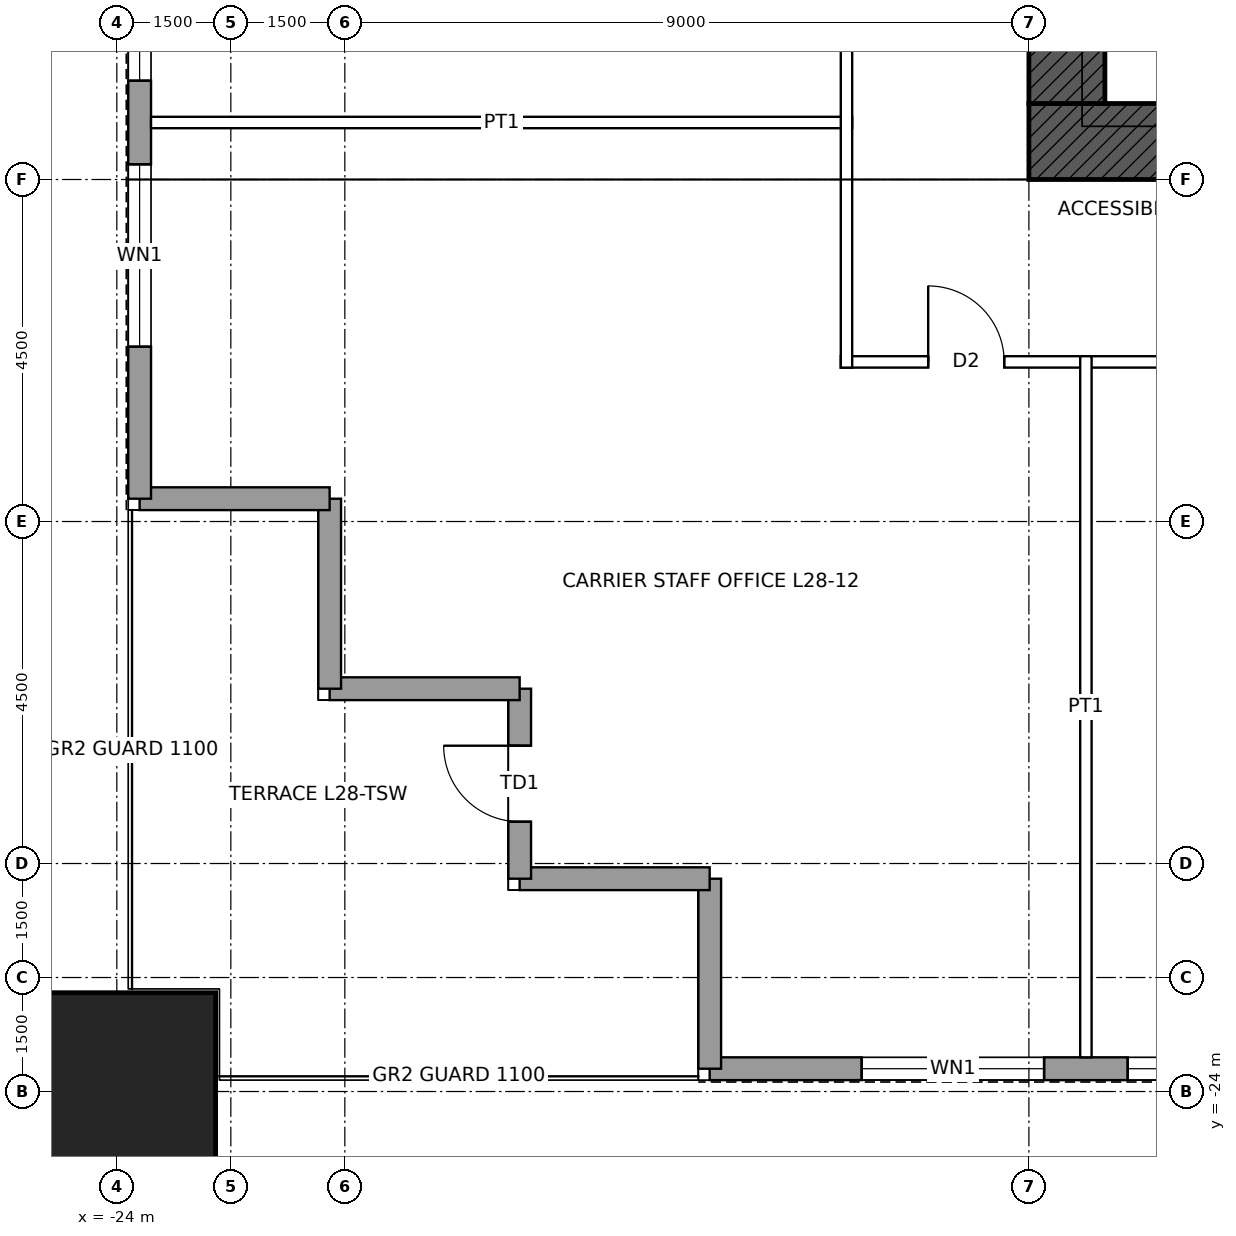
"""IFC4 building model, lengths in metres.
Left out: names, types, materials, properties, quantities, classifications, styles, units other than length and angle.
Written with IfcOpenShell. Run it as: python <this file> out.ifc"""

import sys

from ifc_helpers import new_model, si_unit, direction, frame, frame_2d, origin, origin_2d, place, context, subcontext, project, spatial, rectangle, hollow_rectangle, extrude, element, fill, save


model = new_model("IFC4")
c1 = context("Model", 3, precision=1e-05, world=origin(), true_north=direction((0.0, 1.0)))
c2 = subcontext(c1, "Body", "Model", "MODEL_VIEW")
j1 = project(units=[si_unit("LENGTHUNIT", "METRE"), si_unit("PLANEANGLEUNIT", "RADIAN")], contexts=[c1])
p1 = place(None, origin())
s1 = spatial("IfcSite", under=j1, at=p1, CompositionType="ELEMENT")
p2 = place(p1, origin())
s2 = spatial("IfcBuilding", under=s1, at=p2, CompositionType="ELEMENT")
p3 = place(p2, frame((0.0, 0.0, 140.4)))
s3 = spatial("IfcBuildingStorey", under=s2, at=p3, CompositionType="ELEMENT", Elevation=140.4)
p4 = place(p3, frame((-24.0, -24.0, 0.0), z_axis=(0.0, 0.0, 1.0), x_axis=(1.0, 0.0, 0.0)))
e1 = element("IfcColumn", 1, at=p4, inside=s3, PredefinedType="COLUMN", context=c2, shape_type="SweptSolid", body=[
    extrude(hollow_rectangle(XDim=2.6, YDim=2.6, WallThickness=0.13, at=origin_2d()), origin(), (0.0, 0.0, 1.0), 4.5),
])
p5 = place(p3, frame((12.0, -11.5, 0.0), z_axis=(0.0, 0.0, 1.0), x_axis=(-1.0, 0.0, 0.0)))
e2 = element("IfcWall", 2, at=p5, inside=s3, PredefinedType="SHEAR", context=c2, shape_type="SweptSolid", body=[
    extrude(rectangle(XDim=24.0, YDim=1.0, at=frame_2d((12.0, 0.0))), origin(), (0.0, 0.0, 1.0), 4.5),
])
p6 = place(p5, frame((11.5, 0.0, 0.0)))
e3 = element("IfcOpeningElement", 3, at=p6, cuts=e2, PredefinedType="OPENING", context=c2, shape_type="SweptSolid", body=[
    extrude(rectangle(XDim=1.0, YDim=2.1, at=frame_2d((0.5, 1.05))), frame((0.0, 0.51, 0.0), z_axis=(0.0, -1.0, 0.0), x_axis=(1.0, 0.0, 0.0)), (0.0, 0.0, 1.0), 1.02),
])
p7 = place(p5, frame((1.0, 0.0, 0.0)))
e4 = element("IfcOpeningElement", 4, at=p7, cuts=e2, PredefinedType="OPENING", context=c2, shape_type="SweptSolid", body=[
    extrude(rectangle(XDim=1.0, YDim=2.4, at=frame_2d((0.5, 1.2))), frame((0.0, 0.51, 0.0), z_axis=(0.0, -1.0, 0.0), x_axis=(1.0, 0.0, 0.0)), (0.0, 0.0, 1.0), 1.02),
])
p8 = place(p3, frame((-11.5, -11.0, 0.0), z_axis=(0.0, 0.0, 1.0), x_axis=(0.0, 1.0, 0.0)))
e5 = element("IfcWall", 5, at=p8, inside=s3, PredefinedType="SHEAR", context=c2, shape_type="SweptSolid", body=[
    extrude(rectangle(XDim=22.0, YDim=1.0, at=frame_2d((11.0, 0.0))), origin(), (0.0, 0.0, 1.0), 4.5),
])
p9 = place(p8, frame((10.5, 0.0, 0.0)))
e6 = element("IfcOpeningElement", 6, at=p9, cuts=e5, PredefinedType="OPENING", context=c2, shape_type="SweptSolid", body=[
    extrude(rectangle(XDim=1.0, YDim=2.4, at=frame_2d((0.5, 1.2))), frame((0.0, 0.51, 0.0), z_axis=(0.0, -1.0, 0.0), x_axis=(1.0, 0.0, 0.0)), (0.0, 0.0, 1.0), 1.02),
])
p10 = place(p3, frame((16.2, -23.7, 0.0), z_axis=(0.0, 0.0, 1.0), x_axis=(-1.0, 0.0, 0.0)))
e7 = element("IfcWall", 7, at=p10, inside=s3, PredefinedType="SOLIDWALL", context=c2, shape_type="SweptSolid", body=[
    extrude(rectangle(XDim=32.4, YDim=0.3, at=frame_2d((16.2, 0.0))), origin(), (0.0, 0.0, 1.0), 4.3),
])
p11 = place(p10, frame((2.0, 0.0, 1.0)))
e8 = element("IfcOpeningElement", 8, at=p11, cuts=e7, PredefinedType="OPENING", context=c2, shape_type="SweptSolid", body=[
    extrude(rectangle(XDim=2.4, YDim=1.2, at=frame_2d((1.2, 0.6))), frame((0.0, 0.16, 0.0), z_axis=(0.0, -1.0, 0.0), x_axis=(1.0, 0.0, 0.0)), (0.0, 0.0, 1.0), 0.32),
])
p12 = place(p10, frame((5.5, 0.0, 1.0)))
e9 = element("IfcOpeningElement", 9, at=p12, cuts=e7, PredefinedType="OPENING", context=c2, shape_type="SweptSolid", body=[
    extrude(rectangle(XDim=2.4, YDim=1.2, at=frame_2d((1.2, 0.6))), frame((0.0, 0.16, 0.0), z_axis=(0.0, -1.0, 0.0), x_axis=(1.0, 0.0, 0.0)), (0.0, 0.0, 1.0), 0.32),
])
p13 = place(p10, frame((9.5, 0.0, 1.0)))
e10 = element("IfcOpeningElement", 10, at=p13, cuts=e7, PredefinedType="OPENING", context=c2, shape_type="SweptSolid", body=[
    extrude(rectangle(XDim=2.4, YDim=1.2, at=frame_2d((1.2, 0.6))), frame((0.0, 0.16, 0.0), z_axis=(0.0, -1.0, 0.0), x_axis=(1.0, 0.0, 0.0)), (0.0, 0.0, 1.0), 0.32),
])
p14 = place(p10, frame((13.0, 0.0, 1.0)))
e11 = element("IfcOpeningElement", 11, at=p14, cuts=e7, PredefinedType="OPENING", context=c2, shape_type="SweptSolid", body=[
    extrude(rectangle(XDim=2.4, YDim=1.2, at=frame_2d((1.2, 0.6))), frame((0.0, 0.16, 0.0), z_axis=(0.0, -1.0, 0.0), x_axis=(1.0, 0.0, 0.0)), (0.0, 0.0, 1.0), 0.32),
])
p15 = place(p10, frame((17.0, 0.0, 1.0)))
e12 = element("IfcOpeningElement", 12, at=p15, cuts=e7, PredefinedType="OPENING", context=c2, shape_type="SweptSolid", body=[
    extrude(rectangle(XDim=2.4, YDim=1.2, at=frame_2d((1.2, 0.6))), frame((0.0, 0.16, 0.0), z_axis=(0.0, -1.0, 0.0), x_axis=(1.0, 0.0, 0.0)), (0.0, 0.0, 1.0), 0.32),
])
p16 = place(p10, frame((20.5, 0.0, 1.0)))
e13 = element("IfcOpeningElement", 13, at=p16, cuts=e7, PredefinedType="OPENING", context=c2, shape_type="SweptSolid", body=[
    extrude(rectangle(XDim=2.4, YDim=1.2, at=frame_2d((1.2, 0.6))), frame((0.0, 0.16, 0.0), z_axis=(0.0, -1.0, 0.0), x_axis=(1.0, 0.0, 0.0)), (0.0, 0.0, 1.0), 0.32),
])
p17 = place(p10, frame((24.5, 0.0, 1.0)))
e14 = element("IfcOpeningElement", 14, at=p17, cuts=e7, PredefinedType="OPENING", context=c2, shape_type="SweptSolid", body=[
    extrude(rectangle(XDim=2.4, YDim=1.2, at=frame_2d((1.2, 0.6))), frame((0.0, 0.16, 0.0), z_axis=(0.0, -1.0, 0.0), x_axis=(1.0, 0.0, 0.0)), (0.0, 0.0, 1.0), 0.32),
])
p18 = place(p10, frame((28.0, 0.0, 1.0)))
e15 = element("IfcOpeningElement", 15, at=p18, cuts=e7, PredefinedType="OPENING", context=c2, shape_type="SweptSolid", body=[
    extrude(rectangle(XDim=2.4, YDim=1.2, at=frame_2d((1.2, 0.6))), frame((0.0, 0.16, 0.0), z_axis=(0.0, -1.0, 0.0), x_axis=(1.0, 0.0, 0.0)), (0.0, 0.0, 1.0), 0.32),
])
for number, where, z_axis, x_axis in (
    (16, (-16.2, -23.7, 0.0), (0.0, 0.0, 1.0), (0.0, 1.0, 0.0)),
    (17, (-16.2, -21.2, 0.0), (0.0, 0.0, 1.0), (-1.0, 0.0, 0.0)),
):
    element("IfcWall", number, at=place(p3, frame(where, z_axis=z_axis, x_axis=x_axis)), inside=s3, PredefinedType="SOLIDWALL", context=c2, shape_type="SweptSolid", body=[
        extrude(rectangle(XDim=2.5, YDim=0.3, at=frame_2d((1.25, 0.0))), origin(), (0.0, 0.0, 1.0), 4.3),
    ])
p19 = place(p3, frame((-18.7, -21.2, 0.0), z_axis=(0.0, 0.0, 1.0), x_axis=(0.0, 1.0, 0.0)))
e18 = element("IfcWall", 18, at=p19, inside=s3, PredefinedType="SOLIDWALL", context=c2, shape_type="SweptSolid", body=[
    extrude(rectangle(XDim=2.5, YDim=0.3, at=frame_2d((1.25, 0.0))), origin(), (0.0, 0.0, 1.0), 4.3),
])
p20 = place(p19, frame((0.75, 0.0, 0.0)))
e19 = element("IfcOpeningElement", 19, at=p20, cuts=e18, PredefinedType="OPENING", context=c2, shape_type="SweptSolid", body=[
    extrude(rectangle(XDim=1.0, YDim=2.4, at=frame_2d((0.5, 1.2))), frame((0.0, 0.16, 0.0), z_axis=(0.0, -1.0, 0.0), x_axis=(1.0, 0.0, 0.0)), (0.0, 0.0, 1.0), 0.32),
])
for number, where, z_axis, x_axis in (
    (20, (-18.7, -18.7, 0.0), (0.0, 0.0, 1.0), (-1.0, 0.0, 0.0)),
    (21, (-21.2, -18.7, 0.0), (0.0, 0.0, 1.0), (0.0, 1.0, 0.0)),
    (22, (-21.2, -16.2, 0.0), (0.0, 0.0, 1.0), (-1.0, 0.0, 0.0)),
):
    element("IfcWall", number, at=place(p3, frame(where, z_axis=z_axis, x_axis=x_axis)), inside=s3, PredefinedType="SOLIDWALL", context=c2, shape_type="SweptSolid", body=[
        extrude(rectangle(XDim=2.5, YDim=0.3, at=frame_2d((1.25, 0.0))), origin(), (0.0, 0.0, 1.0), 4.3),
    ])
p21 = place(p3, frame((-23.7, -16.2, 0.0), z_axis=(0.0, 0.0, 1.0), x_axis=(0.0, 1.0, 0.0)))
e23 = element("IfcWall", 23, at=p21, inside=s3, PredefinedType="SOLIDWALL", context=c2, shape_type="SweptSolid", body=[
    extrude(rectangle(XDim=32.4, YDim=0.3, at=frame_2d((16.2, 0.0))), origin(), (0.0, 0.0, 1.0), 4.3),
])
p22 = place(p21, frame((2.0, 0.0, 1.0)))
e24 = element("IfcOpeningElement", 24, at=p22, cuts=e23, PredefinedType="OPENING", context=c2, shape_type="SweptSolid", body=[
    extrude(rectangle(XDim=2.4, YDim=1.2, at=frame_2d((1.2, 0.6))), frame((0.0, 0.16, 0.0), z_axis=(0.0, -1.0, 0.0), x_axis=(1.0, 0.0, 0.0)), (0.0, 0.0, 1.0), 0.32),
])
p23 = place(p21, frame((5.5, 0.0, 1.0)))
e25 = element("IfcOpeningElement", 25, at=p23, cuts=e23, PredefinedType="OPENING", context=c2, shape_type="SweptSolid", body=[
    extrude(rectangle(XDim=2.4, YDim=1.2, at=frame_2d((1.2, 0.6))), frame((0.0, 0.16, 0.0), z_axis=(0.0, -1.0, 0.0), x_axis=(1.0, 0.0, 0.0)), (0.0, 0.0, 1.0), 0.32),
])
p24 = place(p21, frame((9.5, 0.0, 1.0)))
e26 = element("IfcOpeningElement", 26, at=p24, cuts=e23, PredefinedType="OPENING", context=c2, shape_type="SweptSolid", body=[
    extrude(rectangle(XDim=2.4, YDim=1.2, at=frame_2d((1.2, 0.6))), frame((0.0, 0.16, 0.0), z_axis=(0.0, -1.0, 0.0), x_axis=(1.0, 0.0, 0.0)), (0.0, 0.0, 1.0), 0.32),
])
p25 = place(p21, frame((13.0, 0.0, 1.0)))
e27 = element("IfcOpeningElement", 27, at=p25, cuts=e23, PredefinedType="OPENING", context=c2, shape_type="SweptSolid", body=[
    extrude(rectangle(XDim=2.4, YDim=1.2, at=frame_2d((1.2, 0.6))), frame((0.0, 0.16, 0.0), z_axis=(0.0, -1.0, 0.0), x_axis=(1.0, 0.0, 0.0)), (0.0, 0.0, 1.0), 0.32),
])
p26 = place(p21, frame((17.0, 0.0, 1.0)))
e28 = element("IfcOpeningElement", 28, at=p26, cuts=e23, PredefinedType="OPENING", context=c2, shape_type="SweptSolid", body=[
    extrude(rectangle(XDim=2.4, YDim=1.2, at=frame_2d((1.2, 0.6))), frame((0.0, 0.16, 0.0), z_axis=(0.0, -1.0, 0.0), x_axis=(1.0, 0.0, 0.0)), (0.0, 0.0, 1.0), 0.32),
])
p27 = place(p21, frame((20.5, 0.0, 1.0)))
e29 = element("IfcOpeningElement", 29, at=p27, cuts=e23, PredefinedType="OPENING", context=c2, shape_type="SweptSolid", body=[
    extrude(rectangle(XDim=2.4, YDim=1.2, at=frame_2d((1.2, 0.6))), frame((0.0, 0.16, 0.0), z_axis=(0.0, -1.0, 0.0), x_axis=(1.0, 0.0, 0.0)), (0.0, 0.0, 1.0), 0.32),
])
p28 = place(p21, frame((24.5, 0.0, 1.0)))
e30 = element("IfcOpeningElement", 30, at=p28, cuts=e23, PredefinedType="OPENING", context=c2, shape_type="SweptSolid", body=[
    extrude(rectangle(XDim=2.4, YDim=1.2, at=frame_2d((1.2, 0.6))), frame((0.0, 0.16, 0.0), z_axis=(0.0, -1.0, 0.0), x_axis=(1.0, 0.0, 0.0)), (0.0, 0.0, 1.0), 0.32),
])
p29 = place(p21, frame((28.0, 0.0, 1.0)))
e31 = element("IfcOpeningElement", 31, at=p29, cuts=e23, PredefinedType="OPENING", context=c2, shape_type="SweptSolid", body=[
    extrude(rectangle(XDim=2.4, YDim=1.2, at=frame_2d((1.2, 0.6))), frame((0.0, 0.16, 0.0), z_axis=(0.0, -1.0, 0.0), x_axis=(1.0, 0.0, 0.0)), (0.0, 0.0, 1.0), 0.32),
])
p30 = place(p3, frame((-14.475, -14.4, 0.0), z_axis=(0.0, 0.0, 1.0), x_axis=(1.0, 0.0, 0.0)))
e32 = element("IfcWall", 32, at=p30, inside=s3, PredefinedType="PARTITIONING", context=c2, shape_type="SweptSolid", body=[
    extrude(rectangle(XDim=28.95, YDim=0.15, at=frame_2d((14.475, 0.0))), origin(), (0.0, 0.0, 1.0), 4.3),
])
p31 = place(p30, frame((21.075, 0.0, 0.0)))
e33 = element("IfcOpeningElement", 33, at=p31, cuts=e32, PredefinedType="OPENING", context=c2, shape_type="SweptSolid", body=[
    extrude(rectangle(XDim=1.8, YDim=2.4, at=frame_2d((0.9, 1.2))), frame((0.0, 0.085, 0.0), z_axis=(0.0, -1.0, 0.0), x_axis=(1.0, 0.0, 0.0)), (0.0, 0.0, 1.0), 0.17),
])
p32 = place(p30, frame((9.825, 0.0, 0.0)))
e34 = element("IfcOpeningElement", 34, at=p32, cuts=e32, PredefinedType="OPENING", context=c2, shape_type="SweptSolid", body=[
    extrude(rectangle(XDim=1.8, YDim=2.4, at=frame_2d((0.9, 1.2))), frame((0.0, 0.085, 0.0), z_axis=(0.0, -1.0, 0.0), x_axis=(1.0, 0.0, 0.0)), (0.0, 0.0, 1.0), 0.17),
])
p33 = place(p30, frame((26.8, 0.0, 0.0)))
e35 = element("IfcOpeningElement", 35, at=p33, cuts=e32, PredefinedType="OPENING", context=c2, shape_type="SweptSolid", body=[
    extrude(rectangle(XDim=1.0, YDim=2.1, at=frame_2d((0.5, 1.05))), frame((0.0, 0.085, 0.0), z_axis=(0.0, -1.0, 0.0), x_axis=(1.0, 0.0, 0.0)), (0.0, 0.0, 1.0), 0.17),
])
p34 = place(p30, frame((1.15, 0.0, 0.0)))
e36 = element("IfcOpeningElement", 36, at=p34, cuts=e32, PredefinedType="OPENING", context=c2, shape_type="SweptSolid", body=[
    extrude(rectangle(XDim=1.0, YDim=2.1, at=frame_2d((0.5, 1.05))), frame((0.0, 0.085, 0.0), z_axis=(0.0, -1.0, 0.0), x_axis=(1.0, 0.0, 0.0)), (0.0, 0.0, 1.0), 0.17),
])
p35 = place(p3, frame((-23.55, -11.25, 0.0), z_axis=(0.0, 0.0, 1.0), x_axis=(1.0, 0.0, 0.0)))
e37 = element("IfcWall", 37, at=p35, inside=s3, PredefinedType="PARTITIONING", context=c2, shape_type="SweptSolid", body=[
    extrude(rectangle(XDim=9.225, YDim=0.15, at=frame_2d((4.613, 0.0))), origin(), (0.0, 0.0, 1.0), 3.431),
])
p36 = place(p3, frame((-14.4, -14.475, 0.0), z_axis=(0.0, 0.0, 1.0), x_axis=(0.0, 1.0, 0.0)))
e38 = element("IfcWall", 38, at=p36, inside=s3, PredefinedType="PARTITIONING", context=c2, shape_type="SweptSolid", body=[
    extrude(rectangle(XDim=28.95, YDim=0.15, at=frame_2d((14.475, 0.0))), origin(), (0.0, 0.0, 1.0), 4.3),
])
p37 = place(p36, frame((4.2, 0.0, 0.0)))
e39 = element("IfcOpeningElement", 39, at=p37, cuts=e38, PredefinedType="OPENING", context=c2, shape_type="SweptSolid", body=[
    extrude(rectangle(XDim=1.8, YDim=2.4, at=frame_2d((0.9, 1.2))), frame((0.0, 0.085, 0.0), z_axis=(0.0, -1.0, 0.0), x_axis=(1.0, 0.0, 0.0)), (0.0, 0.0, 1.0), 0.17),
])
p38 = place(p36, frame((12.1, 0.0, 0.0)))
e40 = element("IfcOpeningElement", 40, at=p38, cuts=e38, PredefinedType="OPENING", context=c2, shape_type="SweptSolid", body=[
    extrude(rectangle(XDim=1.0, YDim=2.1, at=frame_2d((0.5, 1.05))), frame((0.0, 0.085, 0.0), z_axis=(0.0, -1.0, 0.0), x_axis=(1.0, 0.0, 0.0)), (0.0, 0.0, 1.0), 0.17),
])
p39 = place(p36, frame((21.075, 0.0, 0.0)))
e41 = element("IfcOpeningElement", 41, at=p39, cuts=e38, PredefinedType="OPENING", context=c2, shape_type="SweptSolid", body=[
    extrude(rectangle(XDim=1.8, YDim=2.4, at=frame_2d((0.9, 1.2))), frame((0.0, 0.085, 0.0), z_axis=(0.0, -1.0, 0.0), x_axis=(1.0, 0.0, 0.0)), (0.0, 0.0, 1.0), 0.17),
])
p40 = place(p3, frame((-11.25, -23.55, 0.0), z_axis=(0.0, 0.0, 1.0), x_axis=(0.0, 1.0, 0.0)))
e42 = element("IfcWall", 42, at=p40, inside=s3, PredefinedType="PARTITIONING", context=c2, shape_type="SweptSolid", body=[
    extrude(rectangle(XDim=9.225, YDim=0.15, at=frame_2d((4.613, 0.0))), origin(), (0.0, 0.0, 1.0), 3.431),
])
p41 = place(p17, origin())
e43 = element("IfcWindow", 43, at=p41, inside=s3, PartitioningType="SINGLE_PANEL", PredefinedType="WINDOW", context=c2, shape_type="SweptSolid", body=[
    extrude(rectangle(XDim=2.4, YDim=1.2, at=frame_2d((1.2, 0.6))), frame((0.0, 0.03, 0.0), z_axis=(0.0, -1.0, 0.0), x_axis=(1.0, 0.0, 0.0)), (0.0, 0.0, 1.0), 0.06),
])
fill(e14, e43)
p42 = place(p18, origin())
e44 = element("IfcWindow", 44, at=p42, inside=s3, PartitioningType="SINGLE_PANEL", PredefinedType="WINDOW", context=c2, shape_type="SweptSolid", body=[
    extrude(rectangle(XDim=2.4, YDim=1.2, at=frame_2d((1.2, 0.6))), frame((0.0, 0.03, 0.0), z_axis=(0.0, -1.0, 0.0), x_axis=(1.0, 0.0, 0.0)), (0.0, 0.0, 1.0), 0.06),
])
fill(e15, e44)
p43 = place(p20, origin())
e45 = element("IfcDoor", 45, at=p43, inside=s3, OperationType="SINGLE_SWING_RIGHT", PredefinedType="DOOR", context=c2, shape_type="SweptSolid", body=[
    extrude(rectangle(XDim=1.0, YDim=2.4, at=frame_2d((0.5, 1.2))), frame((0.0, 0.025, 0.0), z_axis=(0.0, -1.0, 0.0), x_axis=(1.0, 0.0, 0.0)), (0.0, 0.0, 1.0), 0.05),
])
fill(e19, e45)
p44 = place(p22, origin())
e46 = element("IfcWindow", 46, at=p44, inside=s3, PartitioningType="SINGLE_PANEL", PredefinedType="WINDOW", context=c2, shape_type="SweptSolid", body=[
    extrude(rectangle(XDim=2.4, YDim=1.2, at=frame_2d((1.2, 0.6))), frame((0.0, 0.03, 0.0), z_axis=(0.0, -1.0, 0.0), x_axis=(1.0, 0.0, 0.0)), (0.0, 0.0, 1.0), 0.06),
])
fill(e24, e46)
p45 = place(p23, origin())
e47 = element("IfcWindow", 47, at=p45, inside=s3, PartitioningType="SINGLE_PANEL", PredefinedType="WINDOW", context=c2, shape_type="SweptSolid", body=[
    extrude(rectangle(XDim=2.4, YDim=1.2, at=frame_2d((1.2, 0.6))), frame((0.0, 0.03, 0.0), z_axis=(0.0, -1.0, 0.0), x_axis=(1.0, 0.0, 0.0)), (0.0, 0.0, 1.0), 0.06),
])
fill(e25, e47)
p46 = place(p34, origin())
e48 = element("IfcDoor", 48, at=p46, inside=s3, OperationType="SINGLE_SWING_LEFT", PredefinedType="DOOR", context=c2, shape_type="SweptSolid", body=[
    extrude(rectangle(XDim=1.0, YDim=2.1, at=frame_2d((0.5, 1.05))), frame((0.0, 0.025, 0.0), z_axis=(0.0, -1.0, 0.0), x_axis=(1.0, 0.0, 0.0)), (0.0, 0.0, 1.0), 0.05),
])
fill(e36, e48)
save(model, sys.argv[1])
